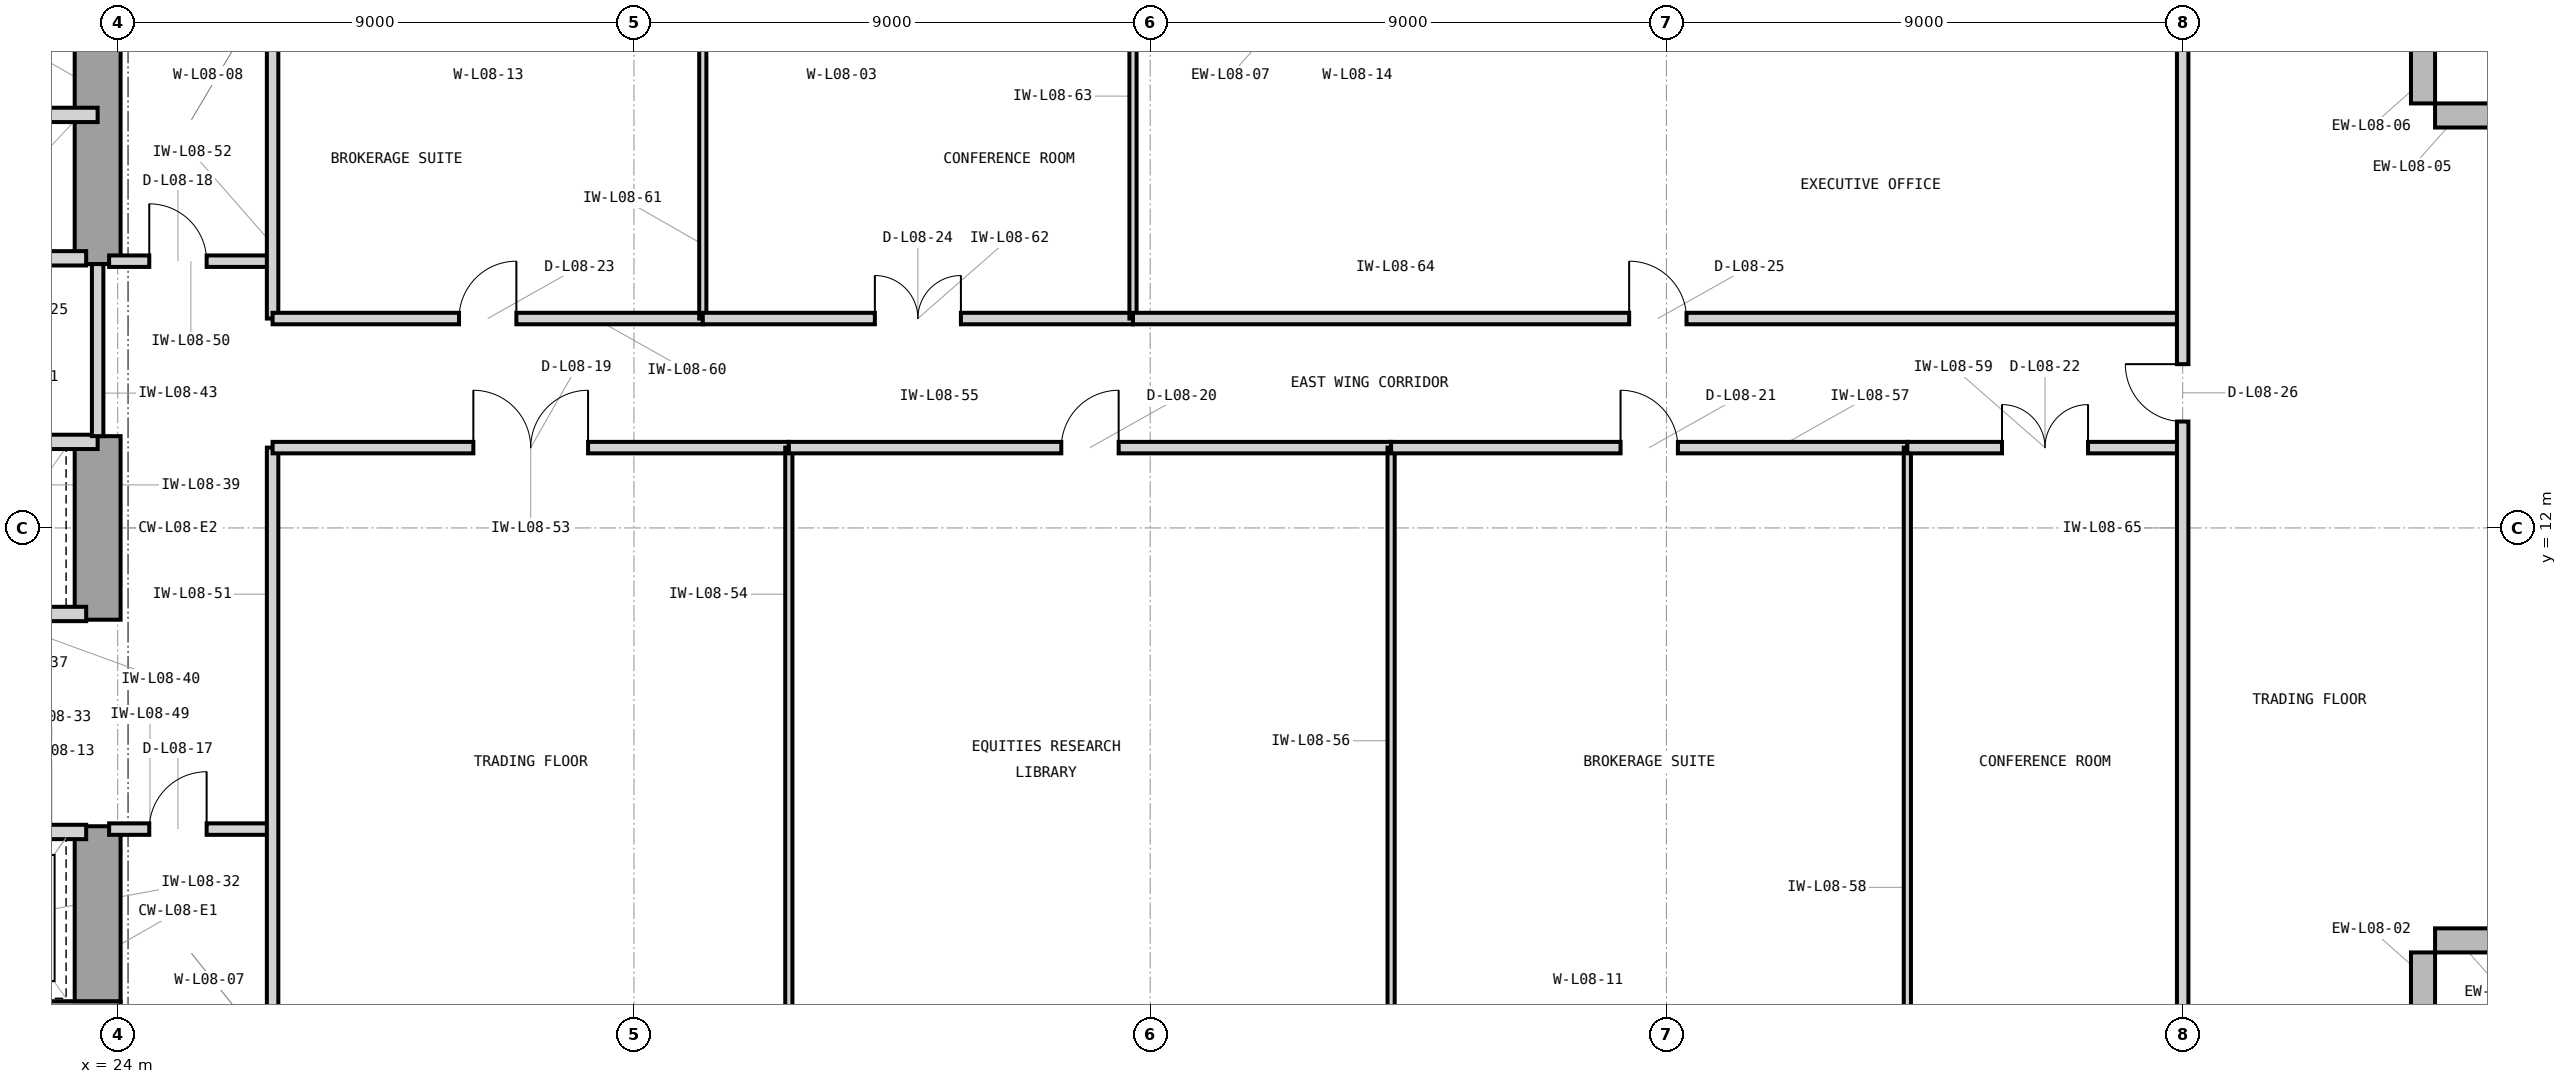
"""IFC4 building model, lengths in metres.
Left out: names, types, materials, properties, quantities, classifications, styles, units other than length and angle.
Written with IfcOpenShell. Run it as: python <this file> out.ifc"""

import sys

from ifc_helpers import new_model, si_unit, direction, frame, frame_2d, origin, place, context, subcontext, project, spatial, rectangle, extrude, element, fill, save


model = new_model("IFC4")
c1 = context("Model", 3, precision=1e-05, world=origin(), true_north=direction((0.0, 1.0)))
c2 = subcontext(c1, "Body", "Model", "MODEL_VIEW")
j1 = project(units=[si_unit("LENGTHUNIT", "METRE"), si_unit("PLANEANGLEUNIT", "RADIAN")], contexts=[c1])
p1 = place(None, origin())
s1 = spatial("IfcSite", under=j1, at=p1, CompositionType="ELEMENT")
p2 = place(p1, origin())
s2 = spatial("IfcBuilding", under=s1, at=p2, CompositionType="ELEMENT")
p3 = place(p2, frame((0.0, 0.0, 38.4)))
s3 = spatial("IfcBuildingStorey", under=s2, at=p3, CompositionType="ELEMENT", Elevation=38.4)
p4 = place(p3, frame((7.475, 3.35, 0.0), z_axis=(0.0, 0.0, 1.0), x_axis=(1.0, 0.0, 0.0)))
e1 = element("IfcWall", 1, at=p4, inside=s3, PredefinedType="SHEAR", context=c2, shape_type="SweptSolid", body=[
    extrude(rectangle(XDim=16.575, YDim=0.8, at=frame_2d((8.288, 0.0))), origin(), (0.0, 0.0, 1.0), 4.2),
])
p5 = place(p3, frame((23.65, 3.75, 0.0), z_axis=(0.0, 0.0, 1.0), x_axis=(0.0, 1.0, 0.0)))
e2 = element("IfcWall", 2, at=p5, inside=s3, PredefinedType="SHEAR", context=c2, shape_type="SweptSolid", body=[
    extrude(rectangle(XDim=3.05, YDim=0.8, at=frame_2d((1.525, 0.0))), origin(), (0.0, 0.0, 1.0), 4.2),
])
p6 = place(p3, frame((23.65, 10.4, 0.0), z_axis=(0.0, 0.0, 1.0), x_axis=(0.0, 1.0, 0.0)))
e3 = element("IfcWall", 3, at=p6, inside=s3, PredefinedType="SHEAR", context=c2, shape_type="SweptSolid", body=[
    extrude(rectangle(XDim=3.2, YDim=0.8, at=frame_2d((1.6, 0.0))), origin(), (0.0, 0.0, 1.0), 4.2),
])
p7 = place(p3, frame((23.65, 16.6, 0.0), z_axis=(0.0, 0.0, 1.0), x_axis=(0.0, 1.0, 0.0)))
e4 = element("IfcWall", 4, at=p7, inside=s3, PredefinedType="SHEAR", context=c2, shape_type="SweptSolid", body=[
    extrude(rectangle(XDim=4.05, YDim=0.8, at=frame_2d((2.025, 0.0))), origin(), (0.0, 0.0, 1.0), 4.2),
])
for number, where, z_axis, x_axis in (
    (5, (64.19, 3.0, 0.0), (0.0, 0.0, 1.0), (0.0, 1.0, 0.0)),
    (6, (64.4, 4.81, 0.0), (0.0, 0.0, 1.0), (1.0, 0.0, 0.0)),
    (7, (66.0, 19.19, 0.0), (0.0, 0.0, 1.0), (-1.0, 0.0, 0.0)),
    (8, (64.19, 19.4, 0.0), (0.0, 0.0, 1.0), (0.0, 1.0, 0.0)),
):
    element("IfcWall", number, at=place(p3, frame(where, z_axis=z_axis, x_axis=x_axis)), inside=s3, PredefinedType="STANDARD", context=c2, shape_type="SweptSolid", body=[
        extrude(rectangle(XDim=1.6, YDim=0.42, at=frame_2d((0.8, 0.0))), origin(), (0.0, 0.0, 1.0), 3.98),
    ])
p8 = place(p3, frame((21.05, 16.7, 0.0), z_axis=(0.0, 0.0, 1.0), x_axis=(1.0, 0.0, 0.0)))
e9 = element("IfcWall", 9, at=p8, inside=s3, PredefinedType="PARTITIONING", context=c2, shape_type="SweptSolid", body=[
    extrude(rectangle(XDim=2.4, YDim=0.25, at=frame_2d((1.2, 0.0))), origin(), (0.0, 0.0, 1.0), 3.426),
])
p9 = place(p3, frame((16.45, 19.2, 0.0), z_axis=(0.0, 0.0, 1.0), x_axis=(1.0, 0.0, 0.0)))
e10 = element("IfcWall", 10, at=p9, inside=s3, PredefinedType="PARTITIONING", context=c2, shape_type="SweptSolid", body=[
    extrude(rectangle(XDim=7.2, YDim=0.25, at=frame_2d((3.6, 0.0))), origin(), (0.0, 0.0, 1.0), 3.97),
])
p10 = place(p3, frame((21.05, 6.7, 0.0), z_axis=(0.0, 0.0, 1.0), x_axis=(1.0, 0.0, 0.0)))
e11 = element("IfcWall", 11, at=p10, inside=s3, PredefinedType="PARTITIONING", context=c2, shape_type="SweptSolid", body=[
    extrude(rectangle(XDim=2.4, YDim=0.25, at=frame_2d((1.2, 0.0))), origin(), (0.0, 0.0, 1.0), 3.426),
])
p11 = place(p10, frame((0.48, 0.0, 0.0)))
e12 = element("IfcOpeningElement", 12, at=p11, cuts=e11, PredefinedType="OPENING", context=c2, shape_type="SweptSolid", body=[
    extrude(rectangle(XDim=1.15, YDim=2.25, at=frame_2d((0.575, 1.125))), frame((0.0, 0.135, 0.0), z_axis=(0.0, -1.0, 0.0), x_axis=(1.0, 0.0, 0.0)), (0.0, 0.0, 1.0), 0.27),
])
p12 = place(p3, frame((21.05, 10.5, 0.0), z_axis=(0.0, 0.0, 1.0), x_axis=(1.0, 0.0, 0.0)))
e13 = element("IfcWall", 13, at=p12, inside=s3, PredefinedType="PARTITIONING", context=c2, shape_type="SweptSolid", body=[
    extrude(rectangle(XDim=2.4, YDim=0.25, at=frame_2d((1.2, 0.0))), origin(), (0.0, 0.0, 1.0), 3.426),
])
p13 = place(p3, frame((14.7, 13.5, 0.0), z_axis=(0.0, 0.0, 1.0), x_axis=(1.0, 0.0, 0.0)))
e14 = element("IfcWall", 14, at=p13, inside=s3, PredefinedType="PARTITIONING", context=c2, shape_type="SweptSolid", body=[
    extrude(rectangle(XDim=8.95, YDim=0.25, at=frame_2d((4.475, 0.0))), origin(), (0.0, 0.0, 1.0), 3.426),
])
p14 = place(p3, frame((23.65, 13.6, 0.0), z_axis=(0.0, 0.0, 1.0), x_axis=(0.0, 1.0, 0.0)))
e15 = element("IfcWall", 15, at=p14, inside=s3, PredefinedType="PARTITIONING", context=c2, shape_type="SweptSolid", body=[
    extrude(rectangle(XDim=3.0, YDim=0.2, at=frame_2d((1.5, 0.0))), origin(), (0.0, 0.0, 1.0), 3.97),
])
p15 = place(p3, frame((23.85, 6.75, 0.0), z_axis=(0.0, 0.0, 1.0), x_axis=(1.0, 0.0, 0.0)))
e16 = element("IfcWall", 16, at=p15, inside=s3, PredefinedType="PARTITIONING", context=c2, shape_type="SweptSolid", body=[
    extrude(rectangle(XDim=2.85, YDim=0.2, at=frame_2d((1.425, 0.0))), origin(), (0.0, 0.0, 1.0), 3.97),
])
p16 = place(p15, frame((0.7, 0.0, 0.0)))
e17 = element("IfcOpeningElement", 17, at=p16, cuts=e16, PredefinedType="OPENING", context=c2, shape_type="SweptSolid", body=[
    extrude(rectangle(XDim=1.0, YDim=2.15, at=frame_2d((0.5, 1.075))), frame((0.0, 0.11, 0.0), z_axis=(0.0, -1.0, 0.0), x_axis=(1.0, 0.0, 0.0)), (0.0, 0.0, 1.0), 0.22),
])
p17 = place(p3, frame((23.85, 16.65, 0.0), z_axis=(0.0, 0.0, 1.0), x_axis=(1.0, 0.0, 0.0)))
e18 = element("IfcWall", 18, at=p17, inside=s3, PredefinedType="PARTITIONING", context=c2, shape_type="SweptSolid", body=[
    extrude(rectangle(XDim=2.85, YDim=0.2, at=frame_2d((1.425, 0.0))), origin(), (0.0, 0.0, 1.0), 3.97),
])
p18 = place(p17, frame((0.7, 0.0, 0.0)))
e19 = element("IfcOpeningElement", 19, at=p18, cuts=e18, PredefinedType="OPENING", context=c2, shape_type="SweptSolid", body=[
    extrude(rectangle(XDim=1.0, YDim=2.15, at=frame_2d((0.5, 1.075))), frame((0.0, 0.11, 0.0), z_axis=(0.0, -1.0, 0.0), x_axis=(1.0, 0.0, 0.0)), (0.0, 0.0, 1.0), 0.22),
])
p19 = place(p3, frame((26.7, 3.18, 0.0), z_axis=(0.0, 0.0, 1.0), x_axis=(0.0, 1.0, 0.0)))
e20 = element("IfcWall", 20, at=p19, inside=s3, PredefinedType="PARTITIONING", context=c2, shape_type="SweptSolid", body=[
    extrude(rectangle(XDim=10.22, YDim=0.2, at=frame_2d((5.11, 0.0))), origin(), (0.0, 0.0, 1.0), 3.97),
])
p20 = place(p3, frame((26.7, 15.65, 0.0), z_axis=(0.0, 0.0, 1.0), x_axis=(0.0, 1.0, 0.0)))
e21 = element("IfcWall", 21, at=p20, inside=s3, PredefinedType="PARTITIONING", context=c2, shape_type="SweptSolid", body=[
    extrude(rectangle(XDim=5.17, YDim=0.2, at=frame_2d((2.585, 0.0))), origin(), (0.0, 0.0, 1.0), 3.97),
])
p21 = place(p3, frame((26.7, 13.4, 0.0), z_axis=(0.0, 0.0, 1.0), x_axis=(1.0, 0.0, 0.0)))
e22 = element("IfcWall", 22, at=p21, inside=s3, PredefinedType="PARTITIONING", context=c2, shape_type="SweptSolid", body=[
    extrude(rectangle(XDim=9.0, YDim=0.2, at=frame_2d((4.5, 0.0))), origin(), (0.0, 0.0, 1.0), 3.97),
])
p22 = place(p21, frame((3.5, 0.0, 0.0)))
e23 = element("IfcOpeningElement", 23, at=p22, cuts=e22, PredefinedType="OPENING", context=c2, shape_type="SweptSolid", body=[
    extrude(rectangle(XDim=2.0, YDim=2.5, at=frame_2d((1.0, 1.25))), frame((0.0, 0.11, 0.0), z_axis=(0.0, -1.0, 0.0), x_axis=(1.0, 0.0, 0.0)), (0.0, 0.0, 1.0), 0.22),
])
p23 = place(p3, frame((35.7, 3.18, 0.0), z_axis=(0.0, 0.0, 1.0), x_axis=(0.0, 1.0, 0.0)))
e24 = element("IfcWall", 24, at=p23, inside=s3, PredefinedType="PARTITIONING", context=c2, shape_type="SweptSolid", body=[
    extrude(rectangle(XDim=10.22, YDim=0.125, at=frame_2d((5.11, 0.0))), origin(), (0.0, 0.0, 1.0), 3.97),
])
p24 = place(p3, frame((35.7, 13.4, 0.0), z_axis=(0.0, 0.0, 1.0), x_axis=(1.0, 0.0, 0.0)))
e25 = element("IfcWall", 25, at=p24, inside=s3, PredefinedType="PARTITIONING", context=c2, shape_type="SweptSolid", body=[
    extrude(rectangle(XDim=10.5, YDim=0.2, at=frame_2d((5.25, 0.0))), origin(), (0.0, 0.0, 1.0), 3.97),
])
p25 = place(p24, frame((4.75, 0.0, 0.0)))
e26 = element("IfcOpeningElement", 26, at=p25, cuts=e25, PredefinedType="OPENING", context=c2, shape_type="SweptSolid", body=[
    extrude(rectangle(XDim=1.0, YDim=2.15, at=frame_2d((0.5, 1.075))), frame((0.0, 0.11, 0.0), z_axis=(0.0, -1.0, 0.0), x_axis=(1.0, 0.0, 0.0)), (0.0, 0.0, 1.0), 0.22),
])
p26 = place(p3, frame((46.2, 3.18, 0.0), z_axis=(0.0, 0.0, 1.0), x_axis=(0.0, 1.0, 0.0)))
e27 = element("IfcWall", 27, at=p26, inside=s3, PredefinedType="PARTITIONING", context=c2, shape_type="SweptSolid", body=[
    extrude(rectangle(XDim=10.22, YDim=0.125, at=frame_2d((5.11, 0.0))), origin(), (0.0, 0.0, 1.0), 3.97),
])
p27 = place(p3, frame((46.2, 13.4, 0.0), z_axis=(0.0, 0.0, 1.0), x_axis=(1.0, 0.0, 0.0)))
e28 = element("IfcWall", 28, at=p27, inside=s3, PredefinedType="PARTITIONING", context=c2, shape_type="SweptSolid", body=[
    extrude(rectangle(XDim=9.0, YDim=0.2, at=frame_2d((4.5, 0.0))), origin(), (0.0, 0.0, 1.0), 3.97),
])
p28 = place(p27, frame((4.0, 0.0, 0.0)))
e29 = element("IfcOpeningElement", 29, at=p28, cuts=e28, PredefinedType="OPENING", context=c2, shape_type="SweptSolid", body=[
    extrude(rectangle(XDim=1.0, YDim=2.15, at=frame_2d((0.5, 1.075))), frame((0.0, 0.11, 0.0), z_axis=(0.0, -1.0, 0.0), x_axis=(1.0, 0.0, 0.0)), (0.0, 0.0, 1.0), 0.22),
])
p29 = place(p3, frame((55.2, 3.18, 0.0), z_axis=(0.0, 0.0, 1.0), x_axis=(0.0, 1.0, 0.0)))
e30 = element("IfcWall", 30, at=p29, inside=s3, PredefinedType="PARTITIONING", context=c2, shape_type="SweptSolid", body=[
    extrude(rectangle(XDim=10.22, YDim=0.125, at=frame_2d((5.11, 0.0))), origin(), (0.0, 0.0, 1.0), 3.97),
])
p30 = place(p3, frame((55.2, 13.4, 0.0), z_axis=(0.0, 0.0, 1.0), x_axis=(1.0, 0.0, 0.0)))
e31 = element("IfcWall", 31, at=p30, inside=s3, PredefinedType="PARTITIONING", context=c2, shape_type="SweptSolid", body=[
    extrude(rectangle(XDim=4.8, YDim=0.2, at=frame_2d((2.4, 0.0))), origin(), (0.0, 0.0, 1.0), 3.97),
])
p31 = place(p30, frame((1.65, 0.0, 0.0)))
e32 = element("IfcOpeningElement", 32, at=p31, cuts=e31, PredefinedType="OPENING", context=c2, shape_type="SweptSolid", body=[
    extrude(rectangle(XDim=1.5, YDim=2.3, at=frame_2d((0.75, 1.15))), frame((0.0, 0.11, 0.0), z_axis=(0.0, -1.0, 0.0), x_axis=(1.0, 0.0, 0.0)), (0.0, 0.0, 1.0), 0.22),
])
p32 = place(p3, frame((26.7, 15.65, 0.0), z_axis=(0.0, 0.0, 1.0), x_axis=(1.0, 0.0, 0.0)))
e33 = element("IfcWall", 33, at=p32, inside=s3, PredefinedType="PARTITIONING", context=c2, shape_type="SweptSolid", body=[
    extrude(rectangle(XDim=7.5, YDim=0.2, at=frame_2d((3.75, 0.0))), origin(), (0.0, 0.0, 1.0), 3.97),
])
p33 = place(p32, frame((3.25, 0.0, 0.0)))
e34 = element("IfcOpeningElement", 34, at=p33, cuts=e33, PredefinedType="OPENING", context=c2, shape_type="SweptSolid", body=[
    extrude(rectangle(XDim=1.0, YDim=2.15, at=frame_2d((0.5, 1.075))), frame((0.0, 0.11, 0.0), z_axis=(0.0, -1.0, 0.0), x_axis=(1.0, 0.0, 0.0)), (0.0, 0.0, 1.0), 0.22),
])
p34 = place(p3, frame((34.2, 15.65, 0.0), z_axis=(0.0, 0.0, 1.0), x_axis=(0.0, 1.0, 0.0)))
e35 = element("IfcWall", 35, at=p34, inside=s3, PredefinedType="PARTITIONING", context=c2, shape_type="SweptSolid", body=[
    extrude(rectangle(XDim=5.17, YDim=0.125, at=frame_2d((2.585, 0.0))), origin(), (0.0, 0.0, 1.0), 3.97),
])
p35 = place(p3, frame((34.2, 15.65, 0.0), z_axis=(0.0, 0.0, 1.0), x_axis=(1.0, 0.0, 0.0)))
e36 = element("IfcWall", 36, at=p35, inside=s3, PredefinedType="PARTITIONING", context=c2, shape_type="SweptSolid", body=[
    extrude(rectangle(XDim=7.5, YDim=0.2, at=frame_2d((3.75, 0.0))), origin(), (0.0, 0.0, 1.0), 3.97),
])
p36 = place(p35, frame((3.0, 0.0, 0.0)))
e37 = element("IfcOpeningElement", 37, at=p36, cuts=e36, PredefinedType="OPENING", context=c2, shape_type="SweptSolid", body=[
    extrude(rectangle(XDim=1.5, YDim=2.3, at=frame_2d((0.75, 1.15))), frame((0.0, 0.11, 0.0), z_axis=(0.0, -1.0, 0.0), x_axis=(1.0, 0.0, 0.0)), (0.0, 0.0, 1.0), 0.22),
])
p37 = place(p3, frame((41.7, 15.65, 0.0), z_axis=(0.0, 0.0, 1.0), x_axis=(0.0, 1.0, 0.0)))
e38 = element("IfcWall", 38, at=p37, inside=s3, PredefinedType="PARTITIONING", context=c2, shape_type="SweptSolid", body=[
    extrude(rectangle(XDim=5.17, YDim=0.125, at=frame_2d((2.585, 0.0))), origin(), (0.0, 0.0, 1.0), 3.97),
])
p38 = place(p3, frame((41.7, 15.65, 0.0), z_axis=(0.0, 0.0, 1.0), x_axis=(1.0, 0.0, 0.0)))
e39 = element("IfcWall", 39, at=p38, inside=s3, PredefinedType="PARTITIONING", context=c2, shape_type="SweptSolid", body=[
    extrude(rectangle(XDim=18.3, YDim=0.2, at=frame_2d((9.15, 0.0))), origin(), (0.0, 0.0, 1.0), 3.97),
])
p39 = place(p38, frame((8.65, 0.0, 0.0)))
e40 = element("IfcOpeningElement", 40, at=p39, cuts=e39, PredefinedType="OPENING", context=c2, shape_type="SweptSolid", body=[
    extrude(rectangle(XDim=1.0, YDim=2.15, at=frame_2d((0.5, 1.075))), frame((0.0, 0.11, 0.0), z_axis=(0.0, -1.0, 0.0), x_axis=(1.0, 0.0, 0.0)), (0.0, 0.0, 1.0), 0.22),
])
p40 = place(p3, frame((60.0, 3.18, 0.0), z_axis=(0.0, 0.0, 1.0), x_axis=(0.0, 1.0, 0.0)))
e41 = element("IfcWall", 41, at=p40, inside=s3, PredefinedType="PARTITIONING", context=c2, shape_type="SweptSolid", body=[
    extrude(rectangle(XDim=17.64, YDim=0.2, at=frame_2d((8.82, 0.0))), origin(), (0.0, 0.0, 1.0), 3.97),
])
p41 = place(p40, frame((10.675, 0.0, 0.0)))
e42 = element("IfcOpeningElement", 42, at=p41, cuts=e41, PredefinedType="OPENING", context=c2, shape_type="SweptSolid", body=[
    extrude(rectangle(XDim=1.0, YDim=2.15, at=frame_2d((0.5, 1.075))), frame((0.0, 0.11, 0.0), z_axis=(0.0, -1.0, 0.0), x_axis=(1.0, 0.0, 0.0)), (0.0, 0.0, 1.0), 0.22),
])
p42 = place(p16, origin())
e43 = element("IfcDoor", 43, at=p42, inside=s3, OperationType="SINGLE_SWING_RIGHT", PredefinedType="DOOR", context=c2, shape_type="SweptSolid", body=[
    extrude(rectangle(XDim=1.0, YDim=2.15, at=frame_2d((0.5, 1.075))), frame((0.0, 0.025, 0.0), z_axis=(0.0, -1.0, 0.0), x_axis=(1.0, 0.0, 0.0)), (0.0, 0.0, 1.0), 0.05),
])
fill(e17, e43)
p43 = place(p18, origin())
e44 = element("IfcDoor", 44, at=p43, inside=s3, OperationType="SINGLE_SWING_LEFT", PredefinedType="DOOR", context=c2, shape_type="SweptSolid", body=[
    extrude(rectangle(XDim=1.0, YDim=2.15, at=frame_2d((0.5, 1.075))), frame((0.0, 0.025, 0.0), z_axis=(0.0, -1.0, 0.0), x_axis=(1.0, 0.0, 0.0)), (0.0, 0.0, 1.0), 0.05),
])
fill(e19, e44)
p44 = place(p22, origin())
e45 = element("IfcDoor", 45, at=p44, inside=s3, OperationType="DOUBLE_DOOR_SINGLE_SWING", PredefinedType="DOOR", context=c2, shape_type="SweptSolid", body=[
    extrude(rectangle(XDim=2.0, YDim=2.5, at=frame_2d((1.0, 1.25))), frame((0.0, 0.025, 0.0), z_axis=(0.0, -1.0, 0.0), x_axis=(1.0, 0.0, 0.0)), (0.0, 0.0, 1.0), 0.05),
])
fill(e23, e45)
p45 = place(p25, origin())
e46 = element("IfcDoor", 46, at=p45, inside=s3, OperationType="SINGLE_SWING_RIGHT", PredefinedType="DOOR", context=c2, shape_type="SweptSolid", body=[
    extrude(rectangle(XDim=1.0, YDim=2.15, at=frame_2d((0.5, 1.075))), frame((0.0, 0.025, 0.0), z_axis=(0.0, -1.0, 0.0), x_axis=(1.0, 0.0, 0.0)), (0.0, 0.0, 1.0), 0.05),
])
fill(e26, e46)
p46 = place(p28, origin())
e47 = element("IfcDoor", 47, at=p46, inside=s3, OperationType="SINGLE_SWING_LEFT", PredefinedType="DOOR", context=c2, shape_type="SweptSolid", body=[
    extrude(rectangle(XDim=1.0, YDim=2.15, at=frame_2d((0.5, 1.075))), frame((0.0, 0.025, 0.0), z_axis=(0.0, -1.0, 0.0), x_axis=(1.0, 0.0, 0.0)), (0.0, 0.0, 1.0), 0.05),
])
fill(e29, e47)
p47 = place(p31, origin())
e48 = element("IfcDoor", 48, at=p47, inside=s3, OperationType="DOUBLE_DOOR_SINGLE_SWING", PredefinedType="DOOR", context=c2, shape_type="SweptSolid", body=[
    extrude(rectangle(XDim=1.5, YDim=2.3, at=frame_2d((0.75, 1.15))), frame((0.0, 0.025, 0.0), z_axis=(0.0, -1.0, 0.0), x_axis=(1.0, 0.0, 0.0)), (0.0, 0.0, 1.0), 0.05),
])
fill(e32, e48)
p48 = place(p33, origin())
e49 = element("IfcDoor", 49, at=p48, inside=s3, OperationType="SINGLE_SWING_RIGHT", PredefinedType="DOOR", context=c2, shape_type="SweptSolid", body=[
    extrude(rectangle(XDim=1.0, YDim=2.15, at=frame_2d((0.5, 1.075))), frame((0.0, 0.025, 0.0), z_axis=(0.0, -1.0, 0.0), x_axis=(1.0, 0.0, 0.0)), (0.0, 0.0, 1.0), 0.05),
])
fill(e34, e49)
p49 = place(p36, origin())
e50 = element("IfcDoor", 50, at=p49, inside=s3, OperationType="DOUBLE_DOOR_SINGLE_SWING", PredefinedType="DOOR", context=c2, shape_type="SweptSolid", body=[
    extrude(rectangle(XDim=1.5, YDim=2.3, at=frame_2d((0.75, 1.15))), frame((0.0, 0.025, 0.0), z_axis=(0.0, -1.0, 0.0), x_axis=(1.0, 0.0, 0.0)), (0.0, 0.0, 1.0), 0.05),
])
fill(e37, e50)
p50 = place(p39, origin())
e51 = element("IfcDoor", 51, at=p50, inside=s3, OperationType="SINGLE_SWING_LEFT", PredefinedType="DOOR", context=c2, shape_type="SweptSolid", body=[
    extrude(rectangle(XDim=1.0, YDim=2.15, at=frame_2d((0.5, 1.075))), frame((0.0, 0.025, 0.0), z_axis=(0.0, -1.0, 0.0), x_axis=(1.0, 0.0, 0.0)), (0.0, 0.0, 1.0), 0.05),
])
fill(e40, e51)
p51 = place(p41, origin())
e52 = element("IfcDoor", 52, at=p51, inside=s3, OperationType="SINGLE_SWING_RIGHT", PredefinedType="DOOR", context=c2, shape_type="SweptSolid", body=[
    extrude(rectangle(XDim=1.0, YDim=2.15, at=frame_2d((0.5, 1.075))), frame((0.0, 0.025, 0.0), z_axis=(0.0, -1.0, 0.0), x_axis=(1.0, 0.0, 0.0)), (0.0, 0.0, 1.0), 0.05),
])
fill(e42, e52)
save(model, sys.argv[1])
